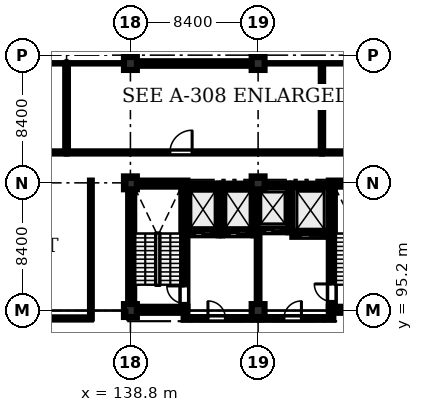
"""IFC4 building model, lengths in metres.
Left out: names, types, materials, properties, quantities, classifications, styles, units other than length and angle.
Written with IfcOpenShell. Run it as: python <this file> out.ifc"""

import sys

from ifc_helpers import new_model, si_unit, direction, frame, frame_2d, origin, origin_2d, place, context, subcontext, project, spatial, rectangle, extrude, element, fill, save


model = new_model("IFC4")
c1 = context("Model", 3, precision=1e-05, world=origin(), true_north=direction((0.0, 1.0)))
c2 = subcontext(c1, "Body", "Model", "MODEL_VIEW")
j1 = project(units=[si_unit("LENGTHUNIT", "METRE"), si_unit("PLANEANGLEUNIT", "RADIAN")], contexts=[c1])
p1 = place(None, origin())
s1 = spatial("IfcSite", under=j1, at=p1, CompositionType="ELEMENT")
p2 = place(p1, origin())
s2 = spatial("IfcBuilding", under=s1, at=p2, CompositionType="ELEMENT")
p3 = place(p2, frame((0.0, 0.0, 23.4)))
s3 = spatial("IfcBuildingStorey", under=s2, at=p3, CompositionType="ELEMENT", Elevation=23.4)
for number, where, z_axis, x_axis in (
    (1, (138.8, 95.2, 0.0), (0.0, 0.0, 1.0), (1.0, 0.0, 0.0)),
    (2, (138.8, 103.6, 0.0), (0.0, 0.0, 1.0), (1.0, 0.0, 0.0)),
    (3, (138.8, 111.45, 0.0), (0.0, 0.0, 1.0), (1.0, 0.0, 0.0)),
    (4, (147.2, 95.2, 0.0), (0.0, 0.0, 1.0), (1.0, 0.0, 0.0)),
    (5, (147.2, 103.6, 0.0), (0.0, 0.0, 1.0), (1.0, 0.0, 0.0)),
    (6, (147.2, 111.45, 0.0), (0.0, 0.0, 1.0), (1.0, 0.0, 0.0)),
):
    element("IfcColumn", number, at=place(p3, frame(where, z_axis=z_axis, x_axis=x_axis)), inside=s3, PredefinedType="COLUMN", context=c2, shape_type="SweptSolid", body=[
        extrude(rectangle(XDim=0.85, YDim=0.85, at=origin_2d()), origin(), (0.0, 0.0, 1.0), 4.0),
    ])
for number, where, z_axis, x_axis in (
    (7, (138.65, 95.25, 0.0), (0.0, 0.0, 1.0), (1.0, 0.0, 0.0)),
    (8, (138.65, 103.55, 0.0), (0.0, 0.0, 1.0), (1.0, 0.0, 0.0)),
):
    element("IfcWall", number, at=place(p3, frame(where, z_axis=z_axis, x_axis=x_axis)), inside=s3, PredefinedType="SHEAR", context=c2, shape_type="SweptSolid", body=[
        extrude(rectangle(XDim=3.9, YDim=0.4, at=frame_2d((1.95, 0.0))), origin(), (0.0, 0.0, 1.0), 4.0),
    ])
p4 = place(p3, frame((138.85, 95.45, 0.0), z_axis=(0.0, 0.0, 1.0), x_axis=(0.0, 1.0, 0.0)))
e9 = element("IfcWall", 9, at=p4, inside=s3, PredefinedType="SHEAR", context=c2, shape_type="SweptSolid", body=[
    extrude(rectangle(XDim=7.9, YDim=0.4, at=frame_2d((3.95, 0.0))), origin(), (0.0, 0.0, 1.0), 4.0),
])
p5 = place(p3, frame((142.35, 95.45, 0.0), z_axis=(0.0, 0.0, 1.0), x_axis=(0.0, 1.0, 0.0)))
e10 = element("IfcWall", 10, at=p5, inside=s3, PredefinedType="SHEAR", context=c2, shape_type="SweptSolid", body=[
    extrude(rectangle(XDim=7.9, YDim=0.4, at=frame_2d((3.95, 0.0))), origin(), (0.0, 0.0, 1.0), 4.0),
])
p6 = place(p5, frame((0.22, 0.0, 0.0)))
e11 = element("IfcOpeningElement", 11, at=p6, cuts=e10, PredefinedType="OPENING", context=c2, shape_type="SweptSolid", body=[
    extrude(rectangle(XDim=1.15, YDim=2.15, at=frame_2d((0.575, 1.075))), frame((0.0, 0.21, 0.0), z_axis=(0.0, -1.0, 0.0), x_axis=(1.0, 0.0, 0.0)), (0.0, 0.0, 1.0), 0.42),
])
for number, where, z_axis, x_axis in (
    (12, (151.85, 95.25, 0.0), (0.0, 0.0, 1.0), (1.0, 0.0, 0.0)),
    (13, (151.85, 103.55, 0.0), (0.0, 0.0, 1.0), (1.0, 0.0, 0.0)),
):
    element("IfcWall", number, at=place(p3, frame(where, z_axis=z_axis, x_axis=x_axis)), inside=s3, PredefinedType="SHEAR", context=c2, shape_type="SweptSolid", body=[
        extrude(rectangle(XDim=3.9, YDim=0.4, at=frame_2d((1.95, 0.0))), origin(), (0.0, 0.0, 1.0), 4.0),
    ])
p7 = place(p3, frame((152.05, 95.45, 0.0), z_axis=(0.0, 0.0, 1.0), x_axis=(0.0, 1.0, 0.0)))
e14 = element("IfcWall", 14, at=p7, inside=s3, PredefinedType="SHEAR", context=c2, shape_type="SweptSolid", body=[
    extrude(rectangle(XDim=7.9, YDim=0.4, at=frame_2d((3.95, 0.0))), origin(), (0.0, 0.0, 1.0), 4.0),
])
p8 = place(p7, frame((0.35, 0.0, 0.0)))
e15 = element("IfcOpeningElement", 15, at=p8, cuts=e14, PredefinedType="OPENING", context=c2, shape_type="SweptSolid", body=[
    extrude(rectangle(XDim=1.15, YDim=2.15, at=frame_2d((0.575, 1.075))), frame((0.0, 0.21, 0.0), z_axis=(0.0, -1.0, 0.0), x_axis=(1.0, 0.0, 0.0)), (0.0, 0.0, 1.0), 0.42),
])
p9 = place(p3, frame((142.55, 100.275, 0.0), z_axis=(0.0, 0.0, 1.0), x_axis=(1.0, 0.0, 0.0)))
e16 = element("IfcWall", 16, at=p9, inside=s3, PredefinedType="SHEAR", context=c2, shape_type="SweptSolid", body=[
    extrude(rectangle(XDim=2.05, YDim=0.25, at=frame_2d((1.025, 0.0))), origin(), (0.0, 0.0, 1.0), 4.0),
])
p10 = place(p9, frame((0.475, 0.0, 0.0)))
e17 = element("IfcOpeningElement", 17, at=p10, cuts=e16, PredefinedType="OPENING", context=c2, shape_type="SweptSolid", body=[
    extrude(rectangle(XDim=1.1, YDim=2.15, at=frame_2d((0.55, 1.075))), frame((0.0, 0.135, 0.0), z_axis=(0.0, -1.0, 0.0), x_axis=(1.0, 0.0, 0.0)), (0.0, 0.0, 1.0), 0.27),
])
p11 = place(p3, frame((142.55, 103.425, 0.0), z_axis=(0.0, 0.0, 1.0), x_axis=(1.0, 0.0, 0.0)))
e18 = element("IfcWall", 18, at=p11, inside=s3, PredefinedType="SHEAR", context=c2, shape_type="SweptSolid", body=[
    extrude(rectangle(XDim=2.05, YDim=0.25, at=frame_2d((1.025, 0.0))), origin(), (0.0, 0.0, 1.0), 4.0),
])
p12 = place(p3, frame((144.725, 100.15, 0.0), z_axis=(0.0, 0.0, 1.0), x_axis=(0.0, 1.0, 0.0)))
e19 = element("IfcWall", 19, at=p12, inside=s3, PredefinedType="SHEAR", context=c2, shape_type="SweptSolid", body=[
    extrude(rectangle(XDim=3.4, YDim=0.25, at=frame_2d((1.7, 0.0))), origin(), (0.0, 0.0, 1.0), 4.0),
])
p13 = place(p3, frame((144.85, 100.275, 0.0), z_axis=(0.0, 0.0, 1.0), x_axis=(1.0, 0.0, 0.0)))
e20 = element("IfcWall", 20, at=p13, inside=s3, PredefinedType="SHEAR", context=c2, shape_type="SweptSolid", body=[
    extrude(rectangle(XDim=2.05, YDim=0.25, at=frame_2d((1.025, 0.0))), origin(), (0.0, 0.0, 1.0), 4.0),
])
p14 = place(p13, frame((0.465, 0.0, 0.0)))
e21 = element("IfcOpeningElement", 21, at=p14, cuts=e20, PredefinedType="OPENING", context=c2, shape_type="SweptSolid", body=[
    extrude(rectangle(XDim=1.12, YDim=2.15, at=frame_2d((0.56, 1.075))), frame((0.0, 0.135, 0.0), z_axis=(0.0, -1.0, 0.0), x_axis=(1.0, 0.0, 0.0)), (0.0, 0.0, 1.0), 0.27),
])
p15 = place(p3, frame((144.85, 103.425, 0.0), z_axis=(0.0, 0.0, 1.0), x_axis=(1.0, 0.0, 0.0)))
e22 = element("IfcWall", 22, at=p15, inside=s3, PredefinedType="SHEAR", context=c2, shape_type="SweptSolid", body=[
    extrude(rectangle(XDim=2.05, YDim=0.25, at=frame_2d((1.025, 0.0))), origin(), (0.0, 0.0, 1.0), 4.0),
])
p16 = place(p3, frame((147.025, 100.15, 0.0), z_axis=(0.0, 0.0, 1.0), x_axis=(0.0, 1.0, 0.0)))
e23 = element("IfcWall", 23, at=p16, inside=s3, PredefinedType="SHEAR", context=c2, shape_type="SweptSolid", body=[
    extrude(rectangle(XDim=3.4, YDim=0.25, at=frame_2d((1.7, 0.0))), origin(), (0.0, 0.0, 1.0), 4.0),
])
p17 = place(p3, frame((147.15, 100.475, 0.0), z_axis=(0.0, 0.0, 1.0), x_axis=(1.0, 0.0, 0.0)))
e24 = element("IfcWall", 24, at=p17, inside=s3, PredefinedType="SHEAR", context=c2, shape_type="SweptSolid", body=[
    extrude(rectangle(XDim=2.05, YDim=0.25, at=frame_2d((1.025, 0.0))), origin(), (0.0, 0.0, 1.0), 4.0),
])
p18 = place(p17, frame((0.495, 0.0, 0.0)))
e25 = element("IfcOpeningElement", 25, at=p18, cuts=e24, PredefinedType="OPENING", context=c2, shape_type="SweptSolid", body=[
    extrude(rectangle(XDim=1.06, YDim=2.15, at=frame_2d((0.53, 1.075))), frame((0.0, 0.135, 0.0), z_axis=(0.0, -1.0, 0.0), x_axis=(1.0, 0.0, 0.0)), (0.0, 0.0, 1.0), 0.27),
])
p19 = place(p3, frame((147.15, 103.425, 0.0), z_axis=(0.0, 0.0, 1.0), x_axis=(1.0, 0.0, 0.0)))
e26 = element("IfcWall", 26, at=p19, inside=s3, PredefinedType="SHEAR", context=c2, shape_type="SweptSolid", body=[
    extrude(rectangle(XDim=2.05, YDim=0.25, at=frame_2d((1.025, 0.0))), origin(), (0.0, 0.0, 1.0), 4.0),
])
p20 = place(p3, frame((149.325, 100.35, 0.0), z_axis=(0.0, 0.0, 1.0), x_axis=(0.0, 1.0, 0.0)))
e27 = element("IfcWall", 27, at=p20, inside=s3, PredefinedType="SHEAR", context=c2, shape_type="SweptSolid", body=[
    extrude(rectangle(XDim=3.2, YDim=0.25, at=frame_2d((1.6, 0.0))), origin(), (0.0, 0.0, 1.0), 4.0),
])
p21 = place(p3, frame((149.45, 100.175, 0.0), z_axis=(0.0, 0.0, 1.0), x_axis=(1.0, 0.0, 0.0)))
e28 = element("IfcWall", 28, at=p21, inside=s3, PredefinedType="SHEAR", context=c2, shape_type="SweptSolid", body=[
    extrude(rectangle(XDim=2.4, YDim=0.25, at=frame_2d((1.2, 0.0))), origin(), (0.0, 0.0, 1.0), 4.0),
])
p22 = place(p21, frame((0.55, 0.0, 0.0)))
e29 = element("IfcOpeningElement", 29, at=p22, cuts=e28, PredefinedType="OPENING", context=c2, shape_type="SweptSolid", body=[
    extrude(rectangle(XDim=1.3, YDim=2.25, at=frame_2d((0.65, 1.125))), frame((0.0, 0.135, 0.0), z_axis=(0.0, -1.0, 0.0), x_axis=(1.0, 0.0, 0.0)), (0.0, 0.0, 1.0), 0.27),
])
p23 = place(p3, frame((149.45, 103.425, 0.0), z_axis=(0.0, 0.0, 1.0), x_axis=(1.0, 0.0, 0.0)))
e30 = element("IfcWall", 30, at=p23, inside=s3, PredefinedType="SHEAR", context=c2, shape_type="SweptSolid", body=[
    extrude(rectangle(XDim=2.4, YDim=0.25, at=frame_2d((1.2, 0.0))), origin(), (0.0, 0.0, 1.0), 4.0),
])
p24 = place(p3, frame((139.225, 111.45, 0.0), z_axis=(0.0, 0.0, 1.0), x_axis=(1.0, 0.0, 0.0)))
e31 = element("IfcWall", 31, at=p24, inside=s3, PredefinedType="STANDARD", context=c2, shape_type="SweptSolid", body=[
    extrude(rectangle(XDim=7.55, YDim=0.3, at=frame_2d((3.775, 0.0))), origin(), (0.0, 0.0, 1.0), 3.3),
])
p25 = place(p24, frame((0.85, 0.0, 0.9)))
e32 = element("IfcOpeningElement", 32, at=p25, cuts=e31, PredefinedType="OPENING", context=c2, shape_type="SweptSolid", body=[
    extrude(rectangle(XDim=1.8, YDim=2.1, at=frame_2d((0.9, 1.05))), frame((0.0, 0.16, 0.0), z_axis=(0.0, -1.0, 0.0), x_axis=(1.0, 0.0, 0.0)), (0.0, 0.0, 1.0), 0.32),
])
p26 = place(p24, frame((4.65, 0.0, 0.9)))
e33 = element("IfcOpeningElement", 33, at=p26, cuts=e31, PredefinedType="OPENING", context=c2, shape_type="SweptSolid", body=[
    extrude(rectangle(XDim=1.8, YDim=2.1, at=frame_2d((0.9, 1.05))), frame((0.0, 0.16, 0.0), z_axis=(0.0, -1.0, 0.0), x_axis=(1.0, 0.0, 0.0)), (0.0, 0.0, 1.0), 0.32),
])
p27 = place(p3, frame((142.3, 94.68, 0.0), z_axis=(0.0, 0.0, 1.0), x_axis=(1.0, 0.0, 0.0)))
e34 = element("IfcWall", 34, at=p27, inside=s3, PredefinedType="STANDARD", context=c2, shape_type="SweptSolid", body=[
    extrude(rectangle(XDim=4.8, YDim=0.18, at=frame_2d((2.4, 0.0))), origin(), (0.0, 0.0, 1.0), 4.0),
])
p28 = place(p27, frame((1.6, 0.0, 0.0)))
e35 = element("IfcOpeningElement", 35, at=p28, cuts=e34, PredefinedType="OPENING", context=c2, shape_type="SweptSolid", body=[
    extrude(rectangle(XDim=1.15, YDim=2.15, at=frame_2d((0.575, 1.075))), frame((0.0, 0.1, 0.0), z_axis=(0.0, -1.0, 0.0), x_axis=(1.0, 0.0, 0.0)), (0.0, 0.0, 1.0), 0.2),
])
p29 = place(p3, frame((147.3, 94.68, 0.0), z_axis=(0.0, 0.0, 1.0), x_axis=(1.0, 0.0, 0.0)))
e36 = element("IfcWall", 36, at=p29, inside=s3, PredefinedType="STANDARD", context=c2, shape_type="SweptSolid", body=[
    extrude(rectangle(XDim=4.85, YDim=0.18, at=frame_2d((2.425, 0.0))), origin(), (0.0, 0.0, 1.0), 4.0),
])
p30 = place(p29, frame((1.6, 0.0, 0.0)))
e37 = element("IfcOpeningElement", 37, at=p30, cuts=e36, PredefinedType="OPENING", context=c2, shape_type="SweptSolid", body=[
    extrude(rectangle(XDim=1.15, YDim=2.15, at=frame_2d((0.575, 1.075))), frame((0.0, 0.1, 0.0), z_axis=(0.0, -1.0, 0.0), x_axis=(1.0, 0.0, 0.0)), (0.0, 0.0, 1.0), 0.2),
])
p31 = place(p3, frame((147.2, 95.75, 0.0), z_axis=(0.0, 0.0, 1.0), x_axis=(0.0, 1.0, 0.0)))
e38 = element("IfcWall", 38, at=p31, inside=s3, PredefinedType="STANDARD", context=c2, shape_type="SweptSolid", body=[
    extrude(rectangle(XDim=4.5, YDim=0.18, at=frame_2d((2.25, 0.0))), origin(), (0.0, 0.0, 1.0), 3.3),
])
p32 = place(p3, frame((136.2, 94.68, 0.0), z_axis=(0.0, 0.0, 1.0), x_axis=(0.0, 1.0, 0.0)))
e39 = element("IfcWall", 39, at=p32, inside=s3, PredefinedType="PARTITIONING", context=c2, shape_type="SweptSolid", body=[
    extrude(rectangle(XDim=9.07, YDim=0.12, at=frame_2d((4.535, 0.0))), origin(), (0.0, 0.0, 1.0), 4.0),
])
p33 = place(p3, frame((122.4, 94.68, 0.0), z_axis=(0.0, 0.0, 1.0), x_axis=(1.0, 0.0, 0.0)))
e40 = element("IfcWall", 40, at=p33, inside=s3, PredefinedType="PARTITIONING", context=c2, shape_type="SweptSolid", body=[
    extrude(rectangle(XDim=13.8, YDim=0.145, at=frame_2d((6.9, 0.0))), origin(), (0.0, 0.0, 1.0), 4.0),
])
p34 = place(p33, frame((3.2, 0.0, 0.0)))
e41 = element("IfcOpeningElement", 41, at=p34, cuts=e40, PredefinedType="OPENING", context=c2, shape_type="SweptSolid", body=[
    extrude(rectangle(XDim=1.12, YDim=2.18, at=frame_2d((0.56, 1.09))), frame((0.0, 0.083, 0.0), z_axis=(0.0, -1.0, 0.0), x_axis=(1.0, 0.0, 0.0)), (0.0, 0.0, 1.0), 0.165),
])
p35 = place(p3, frame((122.15, 105.6, 0.0), z_axis=(0.0, 0.0, 1.0), x_axis=(1.0, 0.0, 0.0)))
e42 = element("IfcWall", 42, at=p35, inside=s3, PredefinedType="PARTITIONING", context=c2, shape_type="SweptSolid", body=[
    extrude(rectangle(XDim=12.45, YDim=0.145, at=frame_2d((6.225, 0.0))), origin(), (0.0, 0.0, 1.0), 4.0),
])
p36 = place(p35, frame((3.75, 0.0, 0.0)))
e43 = element("IfcOpeningElement", 43, at=p36, cuts=e42, PredefinedType="OPENING", context=c2, shape_type="SweptSolid", body=[
    extrude(rectangle(XDim=1.46, YDim=2.22, at=frame_2d((0.73, 1.11))), frame((0.0, 0.083, 0.0), z_axis=(0.0, -1.0, 0.0), x_axis=(1.0, 0.0, 0.0)), (0.0, 0.0, 1.0), 0.165),
])
p37 = place(p3, frame((134.6, 105.6, 0.0), z_axis=(0.0, 0.0, 1.0), x_axis=(1.0, 0.0, 0.0)))
e44 = element("IfcWall", 44, at=p37, inside=s3, PredefinedType="PARTITIONING", context=c2, shape_type="SweptSolid", body=[
    extrude(rectangle(XDim=16.8, YDim=0.145, at=frame_2d((8.4, 0.0))), origin(), (0.0, 0.0, 1.0), 4.0),
])
p38 = place(p37, frame((6.8, 0.0, 0.0)))
e45 = element("IfcOpeningElement", 45, at=p38, cuts=e44, PredefinedType="OPENING", context=c2, shape_type="SweptSolid", body=[
    extrude(rectangle(XDim=1.46, YDim=2.22, at=frame_2d((0.73, 1.11))), frame((0.0, 0.083, 0.0), z_axis=(0.0, -1.0, 0.0), x_axis=(1.0, 0.0, 0.0)), (0.0, 0.0, 1.0), 0.165),
])
p39 = place(p3, frame((134.6, 105.6, 0.0), z_axis=(0.0, 0.0, 1.0), x_axis=(0.0, 1.0, 0.0)))
e46 = element("IfcWall", 46, at=p39, inside=s3, PredefinedType="STANDARD", context=c2, shape_type="SweptSolid", body=[
    extrude(rectangle(XDim=5.75, YDim=0.18, at=frame_2d((2.875, 0.0))), origin(), (0.0, 0.0, 1.0), 3.5),
])
p40 = place(p3, frame((151.4, 105.6, 0.0), z_axis=(0.0, 0.0, 1.0), x_axis=(1.0, 0.0, 0.0)))
e47 = element("IfcWall", 47, at=p40, inside=s3, PredefinedType="PARTITIONING", context=c2, shape_type="SweptSolid", body=[
    extrude(rectangle(XDim=11.95, YDim=0.145, at=frame_2d((5.975, 0.0))), origin(), (0.0, 0.0, 1.0), 4.0),
])
p41 = place(p40, frame((6.8, 0.0, 0.0)))
e48 = element("IfcOpeningElement", 48, at=p41, cuts=e47, PredefinedType="OPENING", context=c2, shape_type="SweptSolid", body=[
    extrude(rectangle(XDim=1.12, YDim=2.18, at=frame_2d((0.56, 1.09))), frame((0.0, 0.083, 0.0), z_axis=(0.0, -1.0, 0.0), x_axis=(1.0, 0.0, 0.0)), (0.0, 0.0, 1.0), 0.165),
])
p42 = place(p3, frame((151.4, 105.6, 0.0), z_axis=(0.0, 0.0, 1.0), x_axis=(0.0, 1.0, 0.0)))
e49 = element("IfcWall", 49, at=p42, inside=s3, PredefinedType="PARTITIONING", context=c2, shape_type="SweptSolid", body=[
    extrude(rectangle(XDim=5.75, YDim=0.158, at=frame_2d((2.875, 0.0))), origin(), (0.0, 0.0, 1.0), 3.5),
])
p43 = place(p25, origin())
e50 = element("IfcWindow", 50, at=p43, inside=s3, PartitioningType="DOUBLE_PANEL_VERTICAL", PredefinedType="WINDOW", context=c2, shape_type="SweptSolid", body=[
    extrude(rectangle(XDim=1.8, YDim=2.1, at=frame_2d((0.9, 1.05))), frame((0.0, 0.03, 0.0), z_axis=(0.0, -1.0, 0.0), x_axis=(1.0, 0.0, 0.0)), (0.0, 0.0, 1.0), 0.06),
])
fill(e32, e50)
p44 = place(p26, origin())
e51 = element("IfcWindow", 51, at=p44, inside=s3, PartitioningType="DOUBLE_PANEL_VERTICAL", PredefinedType="WINDOW", context=c2, shape_type="SweptSolid", body=[
    extrude(rectangle(XDim=1.8, YDim=2.1, at=frame_2d((0.9, 1.05))), frame((0.0, 0.03, 0.0), z_axis=(0.0, -1.0, 0.0), x_axis=(1.0, 0.0, 0.0)), (0.0, 0.0, 1.0), 0.06),
])
fill(e33, e51)
p45 = place(p28, origin())
e52 = element("IfcDoor", 52, at=p45, inside=s3, OperationType="SINGLE_SWING_LEFT", PredefinedType="DOOR", context=c2, shape_type="SweptSolid", body=[
    extrude(rectangle(XDim=1.15, YDim=2.15, at=frame_2d((0.575, 1.075))), frame((0.0, 0.025, 0.0), z_axis=(0.0, -1.0, 0.0), x_axis=(1.0, 0.0, 0.0)), (0.0, 0.0, 1.0), 0.05),
])
fill(e35, e52)
p46 = place(p30, origin())
e53 = element("IfcDoor", 53, at=p46, inside=s3, OperationType="SINGLE_SWING_RIGHT", PredefinedType="DOOR", context=c2, shape_type="SweptSolid", body=[
    extrude(rectangle(XDim=1.15, YDim=2.15, at=frame_2d((0.575, 1.075))), frame((0.0, 0.025, 0.0), z_axis=(0.0, -1.0, 0.0), x_axis=(1.0, 0.0, 0.0)), (0.0, 0.0, 1.0), 0.05),
])
fill(e37, e53)
p47 = place(p38, origin())
e54 = element("IfcDoor", 54, at=p47, inside=s3, OperationType="SINGLE_SWING_RIGHT", PredefinedType="DOOR", context=c2, shape_type="SweptSolid", body=[
    extrude(rectangle(XDim=1.46, YDim=2.22, at=frame_2d((0.73, 1.11))), frame((0.0, 0.025, 0.0), z_axis=(0.0, -1.0, 0.0), x_axis=(1.0, 0.0, 0.0)), (0.0, 0.0, 1.0), 0.05),
])
fill(e45, e54)
p48 = place(p6, origin())
e55 = element("IfcDoor", 55, at=p48, inside=s3, OperationType="SINGLE_SWING_RIGHT", PredefinedType="DOOR", context=c2, shape_type="SweptSolid", body=[
    extrude(rectangle(XDim=1.15, YDim=2.15, at=frame_2d((0.575, 1.075))), frame((0.0, 0.025, 0.0), z_axis=(0.0, -1.0, 0.0), x_axis=(1.0, 0.0, 0.0)), (0.0, 0.0, 1.0), 0.05),
])
fill(e11, e55)
p49 = place(p8, origin())
e56 = element("IfcDoor", 56, at=p49, inside=s3, OperationType="SINGLE_SWING_RIGHT", PredefinedType="DOOR", context=c2, shape_type="SweptSolid", body=[
    extrude(rectangle(XDim=1.15, YDim=2.15, at=frame_2d((0.575, 1.075))), frame((0.0, 0.025, 0.0), z_axis=(0.0, -1.0, 0.0), x_axis=(1.0, 0.0, 0.0)), (0.0, 0.0, 1.0), 0.05),
])
fill(e15, e56)
p50 = place(p10, origin())
e57 = element("IfcDoor", 57, at=p50, inside=s3, OperationType="SLIDING_TO_LEFT", PredefinedType="DOOR", context=c2, shape_type="SweptSolid", body=[
    extrude(rectangle(XDim=1.1, YDim=2.15, at=frame_2d((0.55, 1.075))), frame((0.0, 0.025, 0.0), z_axis=(0.0, -1.0, 0.0), x_axis=(1.0, 0.0, 0.0)), (0.0, 0.0, 1.0), 0.05),
])
fill(e17, e57)
p51 = place(p14, origin())
e58 = element("IfcDoor", 58, at=p51, inside=s3, OperationType="SLIDING_TO_LEFT", PredefinedType="DOOR", context=c2, shape_type="SweptSolid", body=[
    extrude(rectangle(XDim=1.12, YDim=2.15, at=frame_2d((0.56, 1.075))), frame((0.0, 0.025, 0.0), z_axis=(0.0, -1.0, 0.0), x_axis=(1.0, 0.0, 0.0)), (0.0, 0.0, 1.0), 0.05),
])
fill(e21, e58)
p52 = place(p18, origin())
e59 = element("IfcDoor", 59, at=p52, inside=s3, OperationType="SLIDING_TO_LEFT", PredefinedType="DOOR", context=c2, shape_type="SweptSolid", body=[
    extrude(rectangle(XDim=1.06, YDim=2.15, at=frame_2d((0.53, 1.075))), frame((0.0, 0.025, 0.0), z_axis=(0.0, -1.0, 0.0), x_axis=(1.0, 0.0, 0.0)), (0.0, 0.0, 1.0), 0.05),
])
fill(e25, e59)
p53 = place(p22, origin())
e60 = element("IfcDoor", 60, at=p53, inside=s3, OperationType="SLIDING_TO_LEFT", PredefinedType="DOOR", context=c2, shape_type="SweptSolid", body=[
    extrude(rectangle(XDim=1.3, YDim=2.25, at=frame_2d((0.65, 1.125))), frame((0.0, 0.025, 0.0), z_axis=(0.0, -1.0, 0.0), x_axis=(1.0, 0.0, 0.0)), (0.0, 0.0, 1.0), 0.05),
])
fill(e29, e60)
save(model, sys.argv[1])
